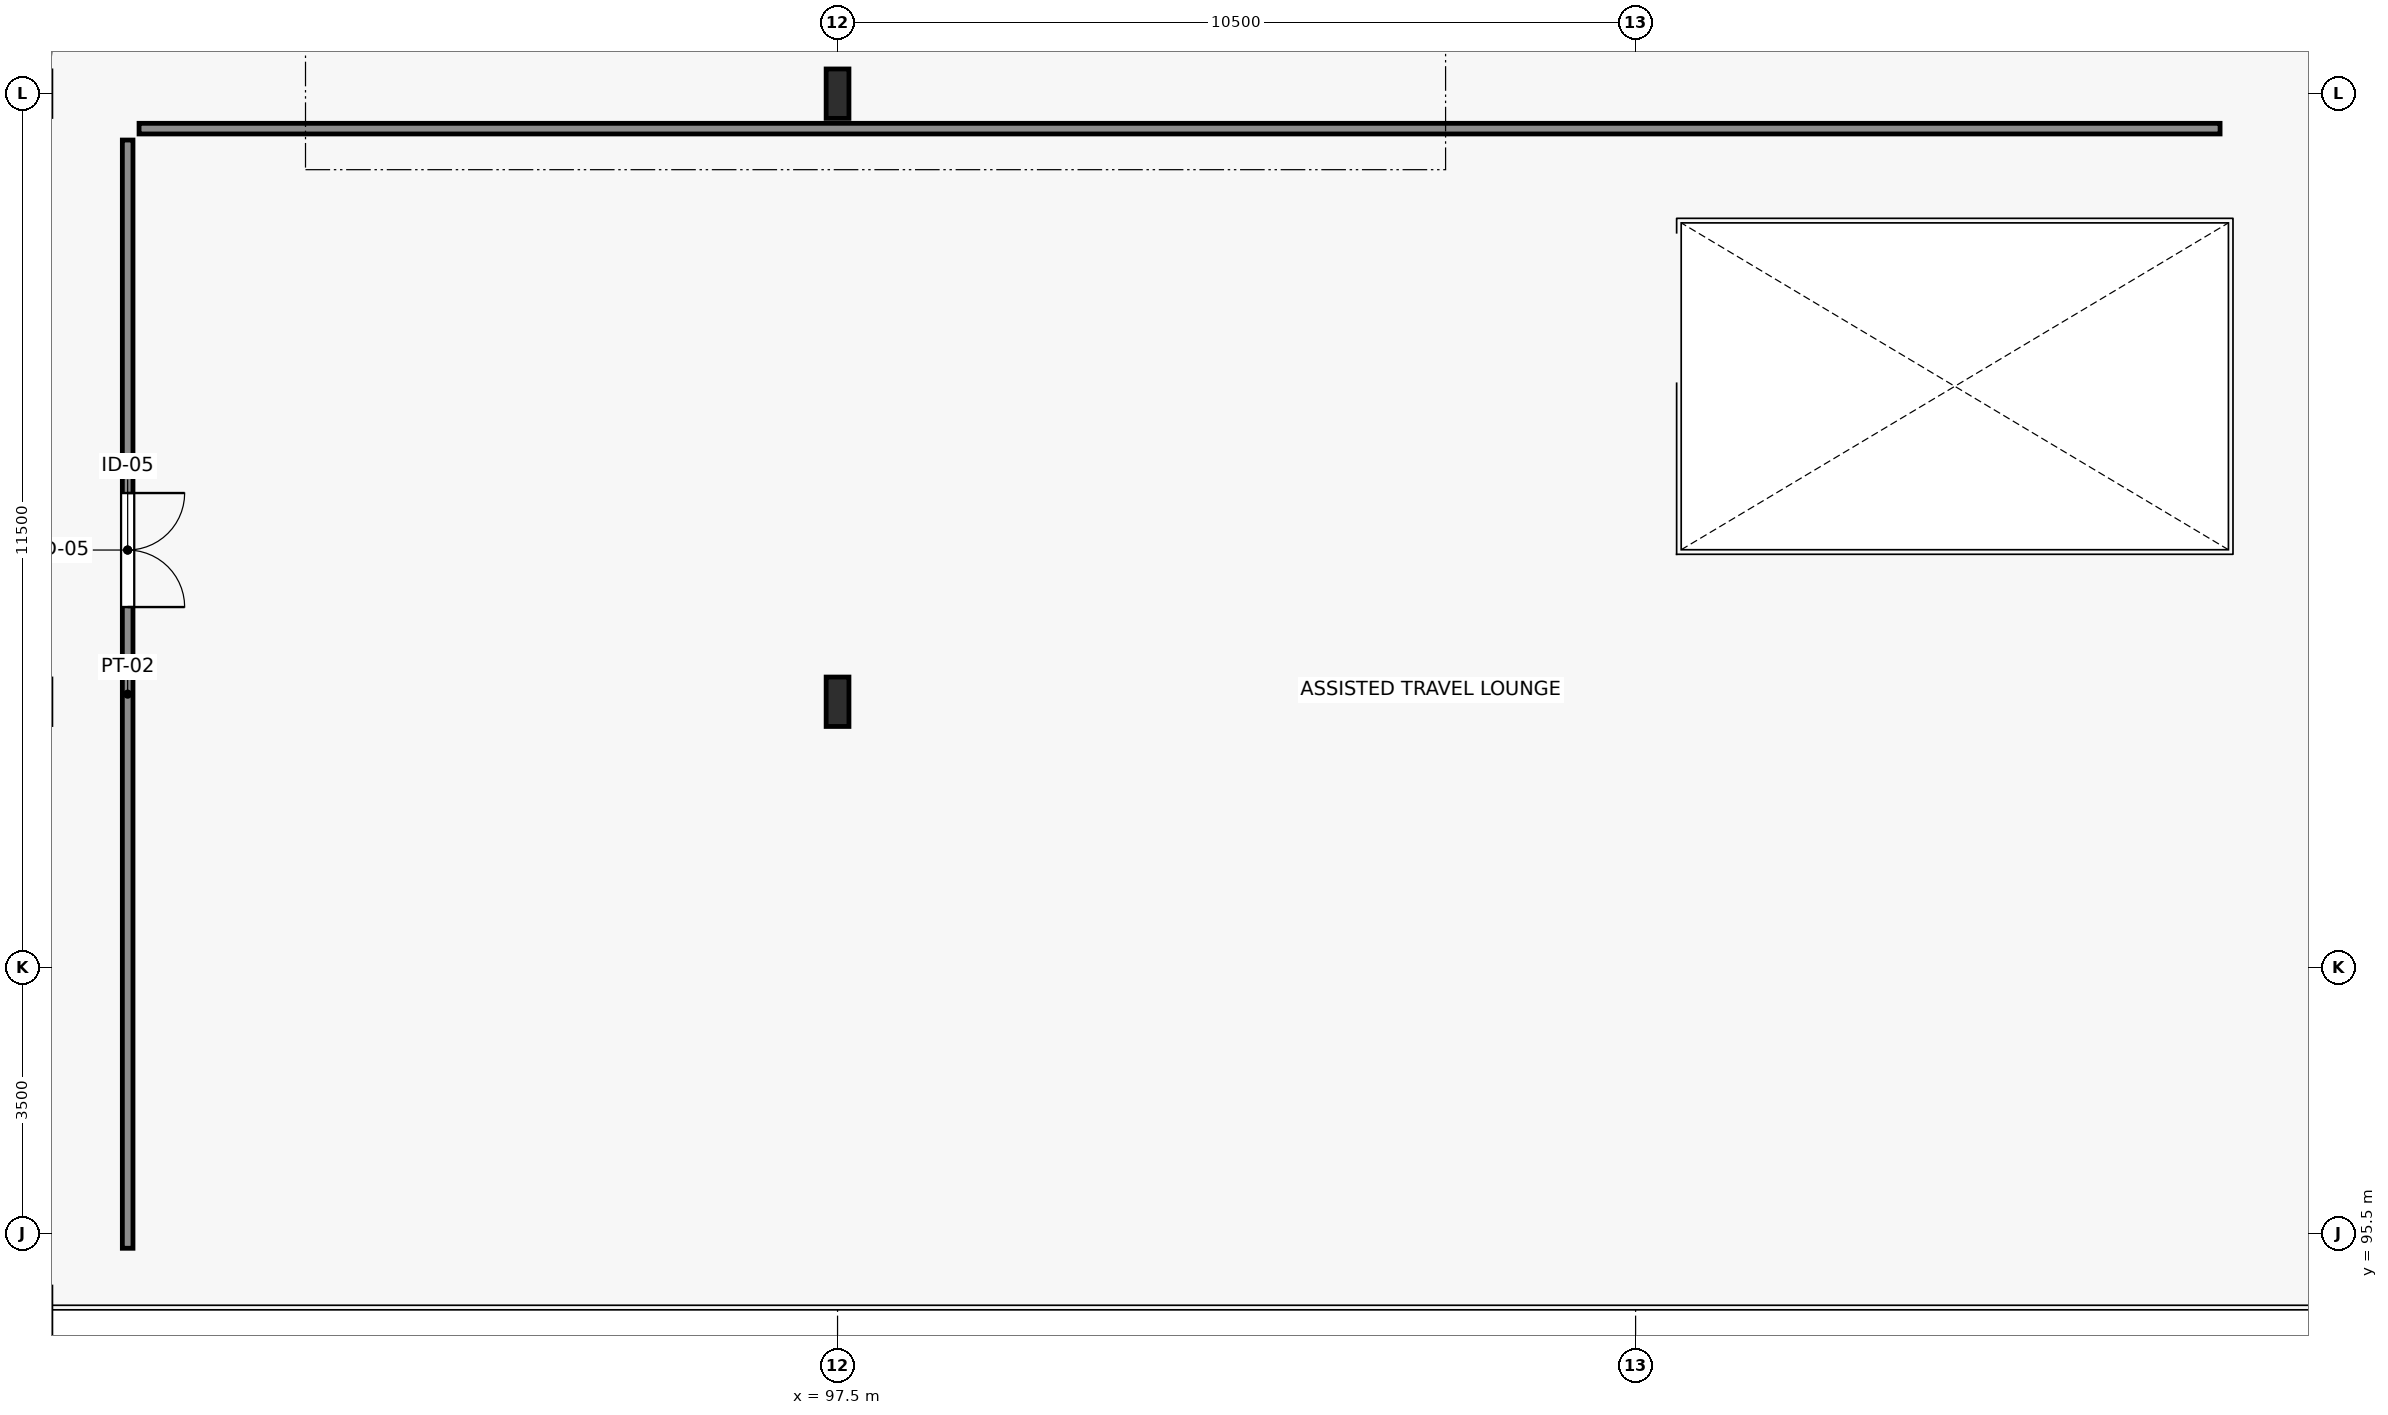
"""IFC4 building model, lengths in metres.
Left out: names, types, materials, properties, quantities, classifications, styles, units other than length and angle.
Written with IfcOpenShell. Run it as: python <this file> out.ifc"""

import sys

from ifc_helpers import new_model, si_unit, direction, frame, frame_2d, origin, origin_2d, place, context, subcontext, project, spatial, rectangle, i_section, extrude, element, fill, save


model = new_model("IFC4")
c1 = context("Model", 3, precision=1e-05, world=origin(), true_north=direction((0.0, 1.0)))
c2 = subcontext(c1, "Body", "Model", "MODEL_VIEW")
j1 = project(units=[si_unit("LENGTHUNIT", "METRE"), si_unit("PLANEANGLEUNIT", "RADIAN")], contexts=[c1])
p1 = place(None, origin())
s1 = spatial("IfcSite", under=j1, at=p1, CompositionType="ELEMENT")
p2 = place(p1, origin())
s2 = spatial("IfcBuilding", under=s1, at=p2, CompositionType="ELEMENT")
p3 = place(p2, frame((0.0, 0.0, 15.0)))
s3 = spatial("IfcBuildingStorey", under=s2, at=p3, CompositionType="ELEMENT", Elevation=15.0)
for number, where, z_axis, x_axis in (
    (1, (97.5, 102.5, 0.0), (0.0, 0.0, 1.0), (1.0, 0.0, 0.0)),
    (2, (97.5, 110.5, 0.0), (0.0, 0.0, 1.0), (1.0, 0.0, 0.0)),
):
    element("IfcColumn", number, at=place(p3, frame(where, z_axis=z_axis, x_axis=x_axis)), inside=s3, PredefinedType="COLUMN", context=c2, shape_type="SweptSolid", body=[
        extrude(i_section(OverallWidth=0.3, OverallDepth=0.65, WebThickness=0.016, FlangeThickness=0.031, FilletRadius=0.027, at=origin_2d()), origin(), (0.0, 0.0, 1.0), 4.5),
    ])
p4 = place(p3, frame((88.16, 109.89, 0.0), z_axis=(0.0, 0.0, 1.0), x_axis=(0.0, -1.0, 0.0)))
e3 = element("IfcWall", 3, at=p4, inside=s3, PredefinedType="PARTITIONING", context=c2, shape_type="SweptSolid", body=[
    extrude(rectangle(XDim=14.58, YDim=0.14, at=frame_2d((7.29, 0.0))), origin(), (0.0, 0.0, 1.0), 3.8),
])
p5 = place(p4, frame((4.644, 0.0, 0.0)))
e4 = element("IfcOpeningElement", 4, at=p5, cuts=e3, PredefinedType="OPENING", context=c2, shape_type="SweptSolid", body=[
    extrude(rectangle(XDim=1.5, YDim=2.2, at=frame_2d((0.75, 1.1))), frame((0.0, 0.08, 0.0), z_axis=(0.0, -1.0, 0.0), x_axis=(1.0, 0.0, 0.0)), (0.0, 0.0, 1.0), 0.16),
])
p6 = place(p3, frame((88.31, 110.04, 0.0), z_axis=(0.0, 0.0, 1.0), x_axis=(1.0, 0.0, 0.0)))
e5 = element("IfcWall", 5, at=p6, inside=s3, PredefinedType="PARTITIONING", context=c2, shape_type="SweptSolid", body=[
    extrude(rectangle(XDim=27.38, YDim=0.14, at=frame_2d((13.69, 0.0))), origin(), (0.0, 0.0, 1.0), 4.25),
])
p7 = place(p5, origin())
e6 = element("IfcDoor", 6, at=p7, inside=s3, OperationType="DOUBLE_DOOR_SINGLE_SWING", PredefinedType="DOOR", context=c2, shape_type="SweptSolid", body=[
    extrude(rectangle(XDim=1.5, YDim=2.2, at=frame_2d((0.75, 1.1))), frame((0.0, 0.025, 0.0), z_axis=(0.0, -1.0, 0.0), x_axis=(1.0, 0.0, 0.0)), (0.0, 0.0, 1.0), 0.05),
])
fill(e4, e6)
save(model, sys.argv[1])
